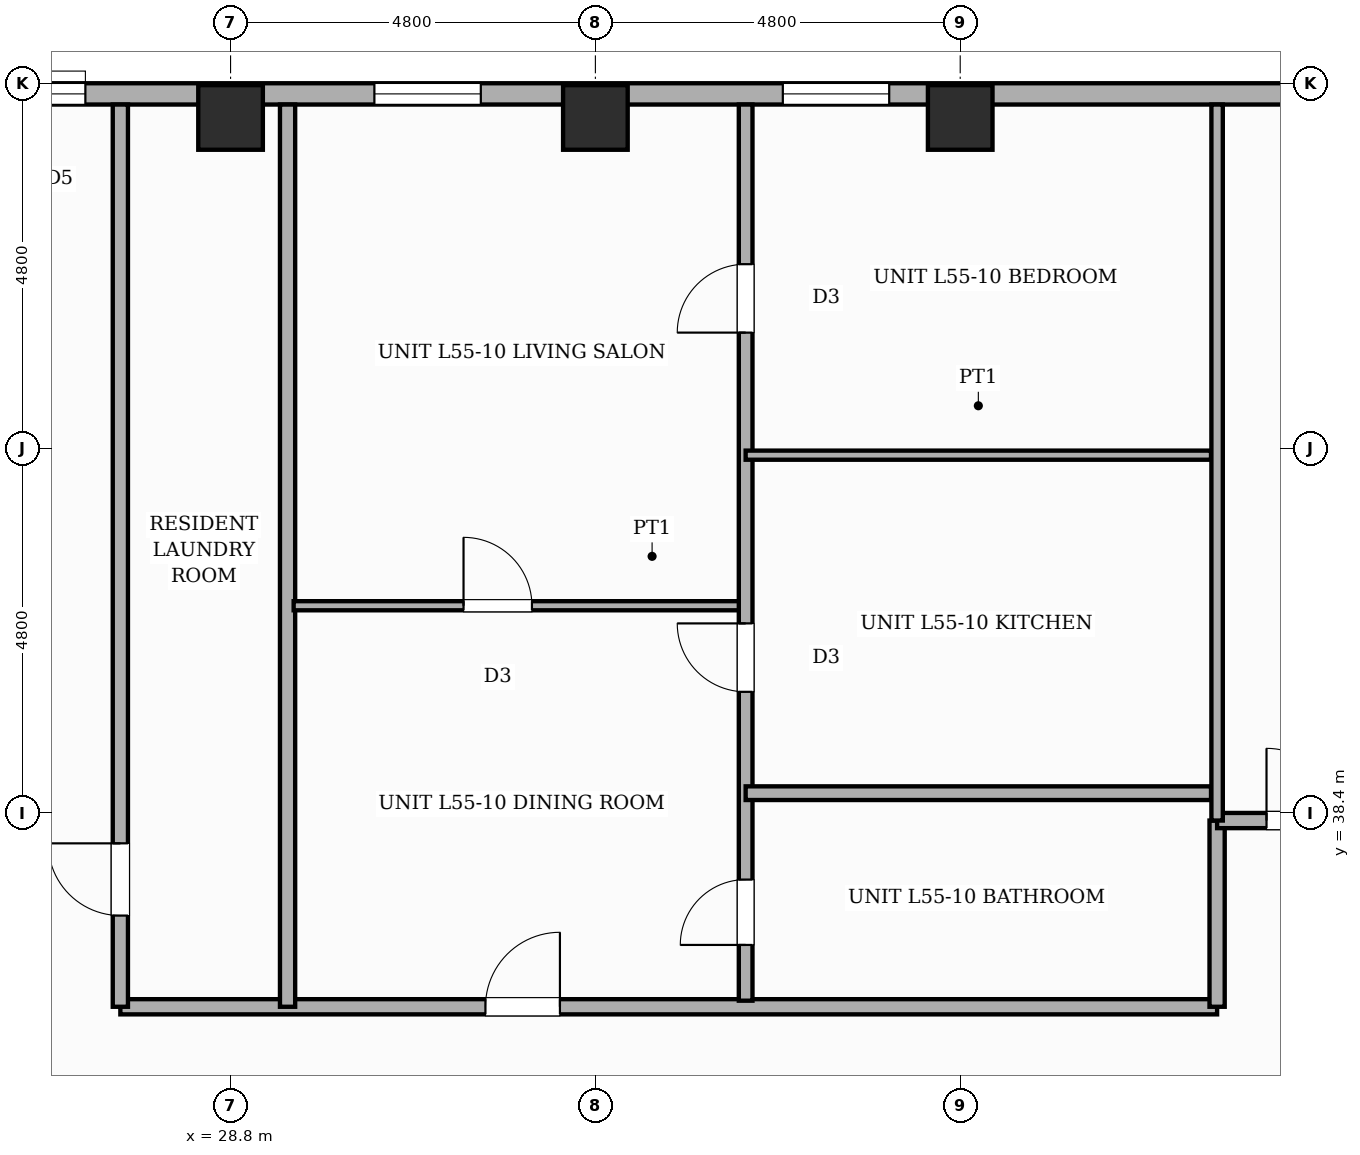
"""IFC4 building model, lengths in metres.
Left out: names, types, materials, properties, quantities, classifications, styles, units other than length and angle.
Written with IfcOpenShell. Run it as: python <this file> out.ifc"""

import sys

from ifc_helpers import new_model, si_unit, direction, frame, frame_2d, origin, origin_2d, place, context, subcontext, project, spatial, rectangle, extrude, element, fill, save


model = new_model("IFC4")
c1 = context("Model", 3, precision=1e-05, world=origin(), true_north=direction((0.0, 1.0)))
c2 = subcontext(c1, "Body", "Model", "MODEL_VIEW")
j1 = project(units=[si_unit("LENGTHUNIT", "METRE"), si_unit("PLANEANGLEUNIT", "RADIAN")], contexts=[c1])
p1 = place(None, origin())
s1 = spatial("IfcSite", under=j1, at=p1, CompositionType="ELEMENT")
p2 = place(p1, origin())
s2 = spatial("IfcBuilding", under=s1, at=p2, CompositionType="ELEMENT")
p3 = place(p2, frame((0.0, 0.0, 211.0)))
s3 = spatial("IfcBuildingStorey", under=s2, at=p3, CompositionType="ELEMENT", Elevation=211.0)
for number, where, z_axis, x_axis in (
    (1, (28.8, 47.55, 0.0), (0.0, 0.0, 1.0), (1.0, 0.0, 0.0)),
    (2, (33.6, 47.55, 0.0), (0.0, 0.0, 1.0), (1.0, 0.0, 0.0)),
    (3, (38.4, 47.55, 0.0), (0.0, 0.0, 1.0), (1.0, 0.0, 0.0)),
):
    element("IfcColumn", number, at=place(p3, frame(where, z_axis=z_axis, x_axis=x_axis)), inside=s3, PredefinedType="COLUMN", context=c2, shape_type="SweptSolid", body=[
        extrude(rectangle(XDim=0.85, YDim=0.85, at=origin_2d()), origin(), (0.0, 0.0, 1.0), 3.6),
    ])
p4 = place(p3, frame((7.2, 47.86, 0.0), z_axis=(0.0, 0.0, 1.0), x_axis=(1.0, 0.0, 0.0)))
e4 = element("IfcWall", 4, at=p4, inside=s3, PredefinedType="STANDARD", context=c2, shape_type="SweptSolid", body=[
    extrude(rectangle(XDim=43.2, YDim=0.28, at=frame_2d((21.6, 0.0))), origin(), (0.0, 0.0, 1.0), 2.66),
])
p5 = place(p4, frame((28.866, 0.0, 0.65)))
e5 = element("IfcOpeningElement", 5, at=p5, cuts=e4, PredefinedType="OPENING", context=c2, shape_type="SweptSolid", body=[
    extrude(rectangle(XDim=1.4, YDim=1.1, at=frame_2d((0.7, 0.55))), frame((0.0, 0.15, 0.0), z_axis=(0.0, -1.0, 0.0), x_axis=(1.0, 0.0, 0.0)), (0.0, 0.0, 1.0), 0.3),
])
p6 = place(p4, frame((41.49, 0.0, 0.65)))
e6 = element("IfcOpeningElement", 6, at=p6, cuts=e4, PredefinedType="OPENING", context=c2, shape_type="SweptSolid", body=[
    extrude(rectangle(XDim=1.4, YDim=1.1, at=frame_2d((0.7, 0.55))), frame((0.0, 0.15, 0.0), z_axis=(0.0, -1.0, 0.0), x_axis=(1.0, 0.0, 0.0)), (0.0, 0.0, 1.0), 0.3),
])
p7 = place(p4, frame((18.74, 0.0, 0.45)))
e7 = element("IfcOpeningElement", 7, at=p7, cuts=e4, PredefinedType="OPENING", context=c2, shape_type="SweptSolid", body=[
    extrude(rectangle(XDim=0.95, YDim=1.8, at=frame_2d((0.475, 0.9))), frame((0.0, 0.15, 0.0), z_axis=(0.0, -1.0, 0.0), x_axis=(1.0, 0.0, 0.0)), (0.0, 0.0, 1.0), 0.3),
])
p8 = place(p4, frame((37.887, 0.0, 0.65)))
e8 = element("IfcOpeningElement", 8, at=p8, cuts=e4, PredefinedType="OPENING", context=c2, shape_type="SweptSolid", body=[
    extrude(rectangle(XDim=1.4, YDim=1.1, at=frame_2d((0.7, 0.55))), frame((0.0, 0.15, 0.0), z_axis=(0.0, -1.0, 0.0), x_axis=(1.0, 0.0, 0.0)), (0.0, 0.0, 1.0), 0.3),
])
p9 = place(p4, frame((0.308, 0.0, 0.65)))
e9 = element("IfcOpeningElement", 9, at=p9, cuts=e4, PredefinedType="OPENING", context=c2, shape_type="SweptSolid", body=[
    extrude(rectangle(XDim=1.4, YDim=1.1, at=frame_2d((0.7, 0.55))), frame((0.0, 0.15, 0.0), z_axis=(0.0, -1.0, 0.0), x_axis=(1.0, 0.0, 0.0)), (0.0, 0.0, 1.0), 0.3),
])
p10 = place(p4, frame((10.302, 0.0, 0.45)))
e10 = element("IfcOpeningElement", 10, at=p10, cuts=e4, PredefinedType="OPENING", context=c2, shape_type="SweptSolid", body=[
    extrude(rectangle(XDim=0.95, YDim=1.8, at=frame_2d((0.475, 0.9))), frame((0.0, 0.15, 0.0), z_axis=(0.0, -1.0, 0.0), x_axis=(1.0, 0.0, 0.0)), (0.0, 0.0, 1.0), 0.3),
])
p11 = place(p4, frame((23.492, 0.0, 0.65)))
e11 = element("IfcOpeningElement", 11, at=p11, cuts=e4, PredefinedType="OPENING", context=c2, shape_type="SweptSolid", body=[
    extrude(rectangle(XDim=1.4, YDim=1.1, at=frame_2d((0.7, 0.55))), frame((0.0, 0.15, 0.0), z_axis=(0.0, -1.0, 0.0), x_axis=(1.0, 0.0, 0.0)), (0.0, 0.0, 1.0), 0.3),
])
p12 = place(p3, frame((27.35, 35.85, 0.0), z_axis=(0.0, 0.0, 1.0), x_axis=(1.0, 0.0, 0.0)))
e12 = element("IfcWall", 12, at=p12, inside=s3, PredefinedType="PARTITIONING", context=c2, shape_type="SweptSolid", body=[
    extrude(rectangle(XDim=14.43, YDim=0.2, at=frame_2d((7.215, 0.0))), origin(), (0.0, 0.0, 1.0), 3.38),
])
p13 = place(p12, frame((4.803, 0.0, 0.0)))
e13 = element("IfcOpeningElement", 13, at=p13, cuts=e12, PredefinedType="OPENING", context=c2, shape_type="SweptSolid", body=[
    extrude(rectangle(XDim=0.98, YDim=2.18, at=frame_2d((0.49, 1.09))), frame((0.0, 0.11, 0.0), z_axis=(0.0, -1.0, 0.0), x_axis=(1.0, 0.0, 0.0)), (0.0, 0.0, 1.0), 0.22),
])
p14 = place(p3, frame((27.35, 35.85, 0.0), z_axis=(0.0, 0.0, 1.0), x_axis=(0.0, 1.0, 0.0)))
e14 = element("IfcWall", 14, at=p14, inside=s3, PredefinedType="PARTITIONING", context=c2, shape_type="SweptSolid", body=[
    extrude(rectangle(XDim=11.87, YDim=0.2, at=frame_2d((5.935, 0.0))), origin(), (0.0, 0.0, 1.0), 3.38),
])
p15 = place(p14, frame((1.2, 0.0, 0.0)))
e15 = element("IfcOpeningElement", 15, at=p15, cuts=e14, PredefinedType="OPENING", context=c2, shape_type="SweptSolid", body=[
    extrude(rectangle(XDim=0.95, YDim=2.15, at=frame_2d((0.475, 1.075))), frame((0.0, 0.11, 0.0), z_axis=(0.0, -1.0, 0.0), x_axis=(1.0, 0.0, 0.0)), (0.0, 0.0, 1.0), 0.22),
])
p16 = place(p3, frame((41.78, 35.85, 0.0), z_axis=(0.0, 0.0, 1.0), x_axis=(0.0, 1.0, 0.0)))
e16 = element("IfcWall", 16, at=p16, inside=s3, PredefinedType="PARTITIONING", context=c2, shape_type="SweptSolid", body=[
    extrude(rectangle(XDim=2.45, YDim=0.2, at=frame_2d((1.225, 0.0))), origin(), (0.0, 0.0, 1.0), 3.38),
])
p17 = place(p3, frame((41.78, 38.3, 0.0), z_axis=(0.0, 0.0, 1.0), x_axis=(1.0, 0.0, 0.0)))
e17 = element("IfcWall", 17, at=p17, inside=s3, PredefinedType="PARTITIONING", context=c2, shape_type="SweptSolid", body=[
    extrude(rectangle(XDim=2.24, YDim=0.2, at=frame_2d((1.12, 0.0))), origin(), (0.0, 0.0, 1.0), 3.38),
])
p18 = place(p17, frame((0.65, 0.0, 0.0)))
e18 = element("IfcOpeningElement", 18, at=p18, cuts=e17, PredefinedType="OPENING", context=c2, shape_type="SweptSolid", body=[
    extrude(rectangle(XDim=0.95, YDim=2.15, at=frame_2d((0.475, 1.075))), frame((0.0, 0.11, 0.0), z_axis=(0.0, -1.0, 0.0), x_axis=(1.0, 0.0, 0.0)), (0.0, 0.0, 1.0), 0.22),
])
p19 = place(p3, frame((29.55, 35.85, 0.0), z_axis=(0.0, 0.0, 1.0), x_axis=(0.0, 1.0, 0.0)))
e19 = element("IfcWall", 19, at=p19, inside=s3, PredefinedType="SOLIDWALL", context=c2, shape_type="SweptSolid", body=[
    extrude(rectangle(XDim=11.87, YDim=0.2, at=frame_2d((5.935, 0.0))), origin(), (0.0, 0.0, 1.0), 3.38),
])
p20 = place(p3, frame((29.63, 41.126, 0.0), z_axis=(0.0, 0.0, 1.0), x_axis=(1.0, 0.0, 0.0)))
e20 = element("IfcWall", 20, at=p20, inside=s3, PredefinedType="PARTITIONING", context=c2, shape_type="SweptSolid", body=[
    extrude(rectangle(XDim=5.947, YDim=0.12, at=frame_2d((2.974, 0.0))), origin(), (0.0, 0.0, 1.0), 3.38),
])
p21 = place(p20, frame((2.235, 0.0, 0.0)))
e21 = element("IfcOpeningElement", 21, at=p21, cuts=e20, PredefinedType="OPENING", context=c2, shape_type="SweptSolid", body=[
    extrude(rectangle(XDim=0.9, YDim=2.15, at=frame_2d((0.45, 1.075))), frame((0.0, 0.07, 0.0), z_axis=(0.0, -1.0, 0.0), x_axis=(1.0, 0.0, 0.0)), (0.0, 0.0, 1.0), 0.14),
])
p22 = place(p3, frame((35.577, 35.93, 0.0), z_axis=(0.0, 0.0, 1.0), x_axis=(0.0, 1.0, 0.0)))
e22 = element("IfcWall", 22, at=p22, inside=s3, PredefinedType="PLUMBINGWALL", context=c2, shape_type="SweptSolid", body=[
    extrude(rectangle(XDim=11.79, YDim=0.18, at=frame_2d((5.895, 0.0))), origin(), (0.0, 0.0, 1.0), 3.38),
])
p23 = place(p22, frame((0.733, 0.0, 0.0)))
e23 = element("IfcOpeningElement", 23, at=p23, cuts=e22, PredefinedType="OPENING", context=c2, shape_type="SweptSolid", body=[
    extrude(rectangle(XDim=0.86, YDim=2.1, at=frame_2d((0.43, 1.05))), frame((0.0, 0.1, 0.0), z_axis=(0.0, -1.0, 0.0), x_axis=(1.0, 0.0, 0.0)), (0.0, 0.0, 1.0), 0.2),
])
p24 = place(p22, frame((4.064, 0.0, 0.0)))
e24 = element("IfcOpeningElement", 24, at=p24, cuts=e22, PredefinedType="OPENING", context=c2, shape_type="SweptSolid", body=[
    extrude(rectangle(XDim=0.9, YDim=2.15, at=frame_2d((0.45, 1.075))), frame((0.0, 0.1, 0.0), z_axis=(0.0, -1.0, 0.0), x_axis=(1.0, 0.0, 0.0)), (0.0, 0.0, 1.0), 0.2),
])
p25 = place(p22, frame((8.789, 0.0, 0.0)))
e25 = element("IfcOpeningElement", 25, at=p25, cuts=e22, PredefinedType="OPENING", context=c2, shape_type="SweptSolid", body=[
    extrude(rectangle(XDim=0.9, YDim=2.15, at=frame_2d((0.45, 1.075))), frame((0.0, 0.1, 0.0), z_axis=(0.0, -1.0, 0.0), x_axis=(1.0, 0.0, 0.0)), (0.0, 0.0, 1.0), 0.2),
])
p26 = place(p3, frame((35.577, 38.66, 0.0), z_axis=(0.0, 0.0, 1.0), x_axis=(1.0, 0.0, 0.0)))
e26 = element("IfcWall", 26, at=p26, inside=s3, PredefinedType="PLUMBINGWALL", context=c2, shape_type="SweptSolid", body=[
    extrude(rectangle(XDim=6.123, YDim=0.18, at=frame_2d((3.062, 0.0))), origin(), (0.0, 0.0, 1.0), 3.38),
])
p27 = place(p3, frame((35.577, 43.107, 0.0), z_axis=(0.0, 0.0, 1.0), x_axis=(1.0, 0.0, 0.0)))
e27 = element("IfcWall", 27, at=p27, inside=s3, PredefinedType="PARTITIONING", context=c2, shape_type="SweptSolid", body=[
    extrude(rectangle(XDim=6.123, YDim=0.12, at=frame_2d((3.062, 0.0))), origin(), (0.0, 0.0, 1.0), 3.38),
])
p28 = place(p3, frame((41.78, 38.3, 0.0), z_axis=(0.0, 0.0, 1.0), x_axis=(0.0, 1.0, 0.0)))
e28 = element("IfcWall", 28, at=p28, inside=s3, PredefinedType="PARTITIONING", context=c2, shape_type="SweptSolid", body=[
    extrude(rectangle(XDim=9.42, YDim=0.15, at=frame_2d((4.71, 0.0))), origin(), (0.0, 0.0, 1.0), 3.38),
])
p29 = place(p5, origin())
e29 = element("IfcWindow", 29, at=p29, inside=s3, PartitioningType="SINGLE_PANEL", PredefinedType="WINDOW", context=c2, shape_type="SweptSolid", body=[
    extrude(rectangle(XDim=1.4, YDim=1.1, at=frame_2d((0.7, 0.55))), frame((0.0, 0.03, 0.0), z_axis=(0.0, -1.0, 0.0), x_axis=(1.0, 0.0, 0.0)), (0.0, 0.0, 1.0), 0.06),
])
fill(e5, e29)
p30 = place(p7, origin())
e30 = element("IfcWindow", 30, at=p30, inside=s3, PartitioningType="SINGLE_PANEL", PredefinedType="WINDOW", context=c2, shape_type="SweptSolid", body=[
    extrude(rectangle(XDim=0.95, YDim=1.8, at=frame_2d((0.475, 0.9))), frame((0.0, 0.03, 0.0), z_axis=(0.0, -1.0, 0.0), x_axis=(1.0, 0.0, 0.0)), (0.0, 0.0, 1.0), 0.06),
])
fill(e7, e30)
p31 = place(p11, origin())
e31 = element("IfcWindow", 31, at=p31, inside=s3, PartitioningType="SINGLE_PANEL", PredefinedType="WINDOW", context=c2, shape_type="SweptSolid", body=[
    extrude(rectangle(XDim=1.4, YDim=1.1, at=frame_2d((0.7, 0.55))), frame((0.0, 0.03, 0.0), z_axis=(0.0, -1.0, 0.0), x_axis=(1.0, 0.0, 0.0)), (0.0, 0.0, 1.0), 0.06),
])
fill(e11, e31)
p32 = place(p15, origin())
e32 = element("IfcDoor", 32, at=p32, inside=s3, OperationType="SINGLE_SWING_RIGHT", PredefinedType="DOOR", context=c2, shape_type="SweptSolid", body=[
    extrude(rectangle(XDim=0.95, YDim=2.15, at=frame_2d((0.475, 1.075))), frame((0.0, 0.025, 0.0), z_axis=(0.0, -1.0, 0.0), x_axis=(1.0, 0.0, 0.0)), (0.0, 0.0, 1.0), 0.05),
])
fill(e15, e32)
p33 = place(p13, origin())
e33 = element("IfcDoor", 33, at=p33, inside=s3, OperationType="SINGLE_SWING_RIGHT", PredefinedType="DOOR", context=c2, shape_type="SweptSolid", body=[
    extrude(rectangle(XDim=0.98, YDim=2.18, at=frame_2d((0.49, 1.09))), frame((0.0, 0.025, 0.0), z_axis=(0.0, -1.0, 0.0), x_axis=(1.0, 0.0, 0.0)), (0.0, 0.0, 1.0), 0.05),
])
fill(e13, e33)
p34 = place(p21, origin())
e34 = element("IfcDoor", 34, at=p34, inside=s3, OperationType="SINGLE_SWING_LEFT", PredefinedType="DOOR", context=c2, shape_type="SweptSolid", body=[
    extrude(rectangle(XDim=0.9, YDim=2.15, at=frame_2d((0.45, 1.075))), frame((0.0, 0.025, 0.0), z_axis=(0.0, -1.0, 0.0), x_axis=(1.0, 0.0, 0.0)), (0.0, 0.0, 1.0), 0.05),
])
fill(e21, e34)
p35 = place(p23, origin())
e35 = element("IfcDoor", 35, at=p35, inside=s3, OperationType="SINGLE_SWING_LEFT", PredefinedType="DOOR", context=c2, shape_type="SweptSolid", body=[
    extrude(rectangle(XDim=0.86, YDim=2.1, at=frame_2d((0.43, 1.05))), frame((0.0, 0.025, 0.0), z_axis=(0.0, -1.0, 0.0), x_axis=(1.0, 0.0, 0.0)), (0.0, 0.0, 1.0), 0.05),
])
fill(e23, e35)
p36 = place(p24, origin())
e36 = element("IfcDoor", 36, at=p36, inside=s3, OperationType="SINGLE_SWING_RIGHT", PredefinedType="DOOR", context=c2, shape_type="SweptSolid", body=[
    extrude(rectangle(XDim=0.9, YDim=2.15, at=frame_2d((0.45, 1.075))), frame((0.0, 0.025, 0.0), z_axis=(0.0, -1.0, 0.0), x_axis=(1.0, 0.0, 0.0)), (0.0, 0.0, 1.0), 0.05),
])
fill(e24, e36)
p37 = place(p25, origin())
e37 = element("IfcDoor", 37, at=p37, inside=s3, OperationType="SINGLE_SWING_LEFT", PredefinedType="DOOR", context=c2, shape_type="SweptSolid", body=[
    extrude(rectangle(XDim=0.9, YDim=2.15, at=frame_2d((0.45, 1.075))), frame((0.0, 0.025, 0.0), z_axis=(0.0, -1.0, 0.0), x_axis=(1.0, 0.0, 0.0)), (0.0, 0.0, 1.0), 0.05),
])
fill(e25, e37)
p38 = place(p18, origin())
e38 = element("IfcDoor", 38, at=p38, inside=s3, OperationType="SINGLE_SWING_LEFT", PredefinedType="DOOR", context=c2, shape_type="SweptSolid", body=[
    extrude(rectangle(XDim=0.95, YDim=2.15, at=frame_2d((0.475, 1.075))), frame((0.0, 0.025, 0.0), z_axis=(0.0, -1.0, 0.0), x_axis=(1.0, 0.0, 0.0)), (0.0, 0.0, 1.0), 0.05),
])
fill(e18, e38)
save(model, sys.argv[1])
